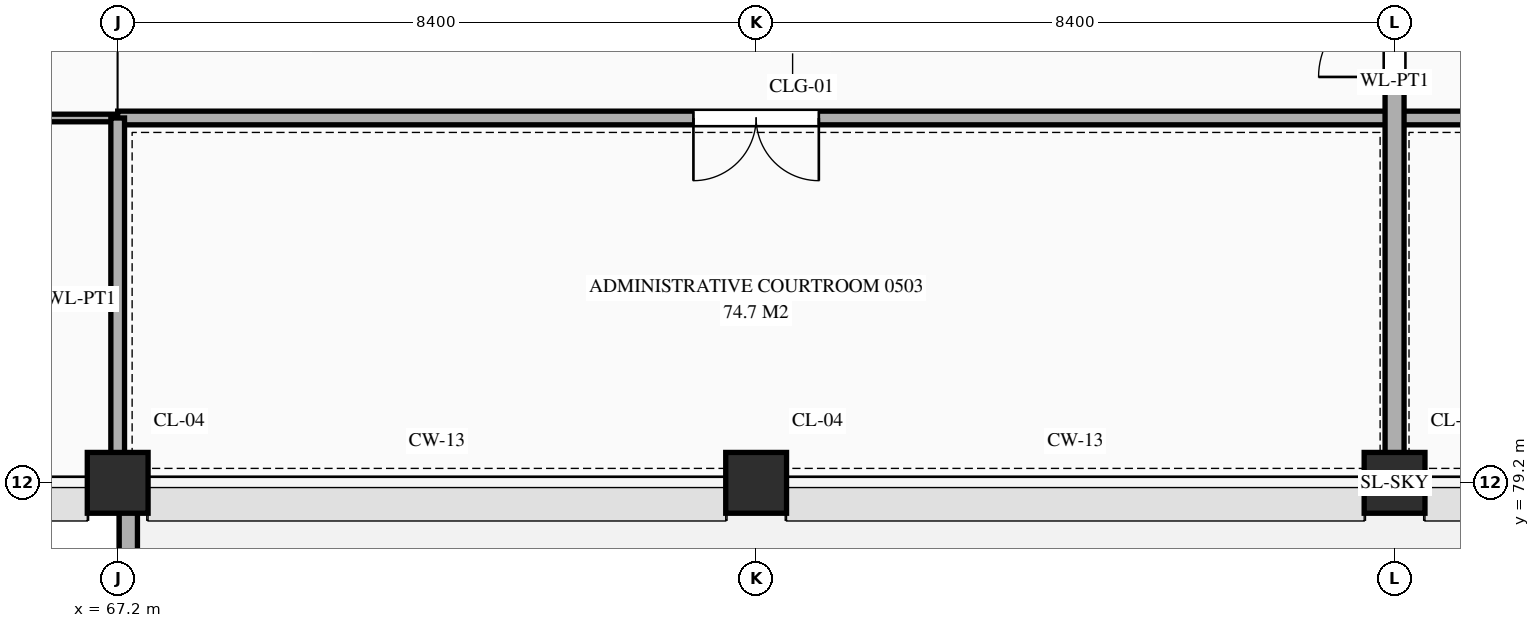
"""IFC4 building model, lengths in metres.
Left out: names, types, materials, properties, quantities, classifications, styles, units other than length and angle.
Written with IfcOpenShell. Run it as: python <this file> out.ifc"""

import sys

from ifc_helpers import new_model, si_unit, direction, frame, frame_2d, origin, origin_2d, place, context, subcontext, project, spatial, rectangle, extrude, element, fill, save


model = new_model("IFC4")
c1 = context("Model", 3, precision=1e-05, world=origin(), true_north=direction((0.0, 1.0)))
c2 = subcontext(c1, "Body", "Model", "MODEL_VIEW")
j1 = project(units=[si_unit("LENGTHUNIT", "METRE"), si_unit("PLANEANGLEUNIT", "RADIAN")], contexts=[c1])
p1 = place(None, origin())
s1 = spatial("IfcSite", under=j1, at=p1, CompositionType="ELEMENT")
p2 = place(p1, origin())
s2 = spatial("IfcBuilding", under=s1, at=p2, CompositionType="ELEMENT")
p3 = place(p2, frame((0.0, 0.0, 21.6)))
s3 = spatial("IfcBuildingStorey", under=s2, at=p3, CompositionType="ELEMENT", Elevation=21.6)
for number, where, z_axis, x_axis in (
    (1, (67.2, 79.2, 0.0), (0.0, 0.0, 1.0), (1.0, 0.0, 0.0)),
    (2, (75.6, 79.2, 0.0), (0.0, 0.0, 1.0), (1.0, 0.0, 0.0)),
    (3, (84.0, 79.2, 0.0), (0.0, 0.0, 1.0), (1.0, 0.0, 0.0)),
):
    element("IfcColumn", number, at=place(p3, frame(where, z_axis=z_axis, x_axis=x_axis)), inside=s3, PredefinedType="COLUMN", context=c2, shape_type="SweptSolid", body=[
        extrude(rectangle(XDim=0.8, YDim=0.8, at=origin_2d()), origin(), (0.0, 0.0, 1.0), 4.5),
    ])
p4 = place(p3, frame((67.34, 78.9, 0.0), z_axis=(0.0, 0.0, 1.0), x_axis=(0.0, -1.0, 0.0)))
e4 = element("IfcWall", 4, at=p4, inside=s3, PredefinedType="PARAPET", context=c2, shape_type="SweptSolid", body=[
    extrude(rectangle(XDim=13.96, YDim=0.24, at=frame_2d((6.98, 0.0))), origin(), (0.0, 0.0, 1.0), 1.2),
])
p5 = place(p3, frame((50.4, 84.0, 0.0), z_axis=(0.0, 0.0, 1.0), x_axis=(1.0, 0.0, 0.0)))
e5 = element("IfcWall", 5, at=p5, inside=s3, PredefinedType="STANDARD", context=c2, shape_type="SweptSolid", body=[
    extrude(rectangle(XDim=16.8, YDim=0.1, at=frame_2d((8.4, 0.0))), origin(), (0.0, 0.0, 1.0), 4.24),
])
p6 = place(p5, frame((3.69, 0.0, 0.0)))
e6 = element("IfcOpeningElement", 6, at=p6, cuts=e5, PredefinedType="OPENING", context=c2, shape_type="SweptSolid", body=[
    extrude(rectangle(XDim=1.02, YDim=2.4, at=frame_2d((0.51, 1.2))), frame((0.0, 0.062, 0.0), z_axis=(0.0, -1.0, 0.0), x_axis=(1.0, 0.0, 0.0)), (0.0, 0.0, 1.0), 0.124),
])
p7 = place(p5, frame((12.07, 0.0, 0.0)))
e7 = element("IfcOpeningElement", 7, at=p7, cuts=e5, PredefinedType="OPENING", context=c2, shape_type="SweptSolid", body=[
    extrude(rectangle(XDim=1.06, YDim=2.4, at=frame_2d((0.53, 1.2))), frame((0.0, 0.062, 0.0), z_axis=(0.0, -1.0, 0.0), x_axis=(1.0, 0.0, 0.0)), (0.0, 0.0, 1.0), 0.124),
])
p8 = place(p3, frame((67.2, 84.0, 0.0), z_axis=(0.0, 0.0, 1.0), x_axis=(1.0, 0.0, 0.0)))
e8 = element("IfcWall", 8, at=p8, inside=s3, PredefinedType="STANDARD", context=c2, shape_type="SweptSolid", body=[
    extrude(rectangle(XDim=33.6, YDim=0.18, at=frame_2d((16.8, 0.0))), origin(), (0.0, 0.0, 1.0), 4.24),
])
p9 = place(p8, frame((7.575, 0.0, 0.0)))
e9 = element("IfcOpeningElement", 9, at=p9, cuts=e8, PredefinedType="OPENING", context=c2, shape_type="SweptSolid", body=[
    extrude(rectangle(XDim=1.65, YDim=2.4, at=frame_2d((0.825, 1.2))), frame((0.0, 0.102, 0.0), z_axis=(0.0, -1.0, 0.0), x_axis=(1.0, 0.0, 0.0)), (0.0, 0.0, 1.0), 0.204),
])
p10 = place(p8, frame((24.35, 0.0, 0.0)))
e10 = element("IfcOpeningElement", 10, at=p10, cuts=e8, PredefinedType="OPENING", context=c2, shape_type="SweptSolid", body=[
    extrude(rectangle(XDim=1.7, YDim=2.45, at=frame_2d((0.85, 1.225))), frame((0.0, 0.102, 0.0), z_axis=(0.0, -1.0, 0.0), x_axis=(1.0, 0.0, 0.0)), (0.0, 0.0, 1.0), 0.204),
])
p11 = place(p3, frame((67.2, 79.24, 0.0), z_axis=(0.0, 0.0, 1.0), x_axis=(0.0, 1.0, 0.0)))
e11 = element("IfcWall", 11, at=p11, inside=s3, PredefinedType="STANDARD", context=c2, shape_type="SweptSolid", body=[
    extrude(rectangle(XDim=4.76, YDim=0.18, at=frame_2d((2.38, 0.0))), origin(), (0.0, 0.0, 1.0), 3.49),
])
p12 = place(p3, frame((84.0, 79.24, 0.0), z_axis=(0.0, 0.0, 1.0), x_axis=(0.0, 1.0, 0.0)))
e12 = element("IfcWall", 12, at=p12, inside=s3, PredefinedType="STANDARD", context=c2, shape_type="SweptSolid", body=[
    extrude(rectangle(XDim=35.92, YDim=0.25, at=frame_2d((17.96, 0.0))), origin(), (0.0, 0.0, 1.0), 3.49),
])
p13 = place(p12, frame((22.72, 0.0, 0.0)))
e13 = element("IfcOpeningElement", 13, at=p13, cuts=e12, PredefinedType="OPENING", context=c2, shape_type="SweptSolid", body=[
    extrude(rectangle(XDim=1.6, YDim=2.3, at=frame_2d((0.8, 1.15))), frame((0.0, 0.137, 0.0), z_axis=(0.0, -1.0, 0.0), x_axis=(1.0, 0.0, 0.0)), (0.0, 0.0, 1.0), 0.274),
])
p14 = place(p12, frame((12.45, 0.0, 0.0)))
e14 = element("IfcOpeningElement", 14, at=p14, cuts=e12, PredefinedType="OPENING", context=c2, shape_type="SweptSolid", body=[
    extrude(rectangle(XDim=1.1, YDim=2.2, at=frame_2d((0.55, 1.1))), frame((0.0, 0.137, 0.0), z_axis=(0.0, -1.0, 0.0), x_axis=(1.0, 0.0, 0.0)), (0.0, 0.0, 1.0), 0.274),
])
p15 = place(p12, frame((15.245, 0.0, 0.0)))
e15 = element("IfcOpeningElement", 15, at=p15, cuts=e12, PredefinedType="OPENING", context=c2, shape_type="SweptSolid", body=[
    extrude(rectangle(XDim=0.95, YDim=2.15, at=frame_2d((0.475, 1.075))), frame((0.0, 0.137, 0.0), z_axis=(0.0, -1.0, 0.0), x_axis=(1.0, 0.0, 0.0)), (0.0, 0.0, 1.0), 0.274),
])
p16 = place(p12, frame((25.9, 0.0, 0.0)))
e16 = element("IfcOpeningElement", 16, at=p16, cuts=e12, PredefinedType="OPENING", context=c2, shape_type="SweptSolid", body=[
    extrude(rectangle(XDim=1.8, YDim=2.35, at=frame_2d((0.9, 1.175))), frame((0.0, 0.137, 0.0), z_axis=(0.0, -1.0, 0.0), x_axis=(1.0, 0.0, 0.0)), (0.0, 0.0, 1.0), 0.274),
])
p17 = place(p12, frame((29.62, 0.0, 0.0)))
e17 = element("IfcOpeningElement", 17, at=p17, cuts=e12, PredefinedType="OPENING", context=c2, shape_type="SweptSolid", body=[
    extrude(rectangle(XDim=1.0, YDim=2.2, at=frame_2d((0.5, 1.1))), frame((0.0, 0.137, 0.0), z_axis=(0.0, -1.0, 0.0), x_axis=(1.0, 0.0, 0.0)), (0.0, 0.0, 1.0), 0.274),
])
p18 = place(p12, frame((5.3, 0.0, 0.0)))
e18 = element("IfcOpeningElement", 18, at=p18, cuts=e12, PredefinedType="OPENING", context=c2, shape_type="SweptSolid", body=[
    extrude(rectangle(XDim=1.0, YDim=2.2, at=frame_2d((0.5, 1.1))), frame((0.0, 0.137, 0.0), z_axis=(0.0, -1.0, 0.0), x_axis=(1.0, 0.0, 0.0)), (0.0, 0.0, 1.0), 0.274),
])
p19 = place(p18, origin())
e19 = element("IfcDoor", 19, at=p19, inside=s3, OperationType="SINGLE_SWING_LEFT", PredefinedType="DOOR", context=c2, shape_type="SweptSolid", body=[
    extrude(rectangle(XDim=1.0, YDim=2.2, at=frame_2d((0.5, 1.1))), frame((0.0, 0.025, 0.0), z_axis=(0.0, -1.0, 0.0), x_axis=(1.0, 0.0, 0.0)), (0.0, 0.0, 1.0), 0.05),
])
fill(e18, e19)
p20 = place(p9, frame((1.65, 0.0, 0.0), z_axis=(0.0, 0.0, 1.0), x_axis=(-1.0, 0.0, 0.0)))
e20 = element("IfcDoor", 20, at=p20, inside=s3, OperationType="DOUBLE_DOOR_SINGLE_SWING", PredefinedType="DOOR", context=c2, shape_type="SweptSolid", body=[
    extrude(rectangle(XDim=1.65, YDim=2.4, at=frame_2d((0.825, 1.2))), frame((0.0, 0.025, 0.0), z_axis=(0.0, -1.0, 0.0), x_axis=(1.0, 0.0, 0.0)), (0.0, 0.0, 1.0), 0.05),
])
fill(e9, e20)
save(model, sys.argv[1])
